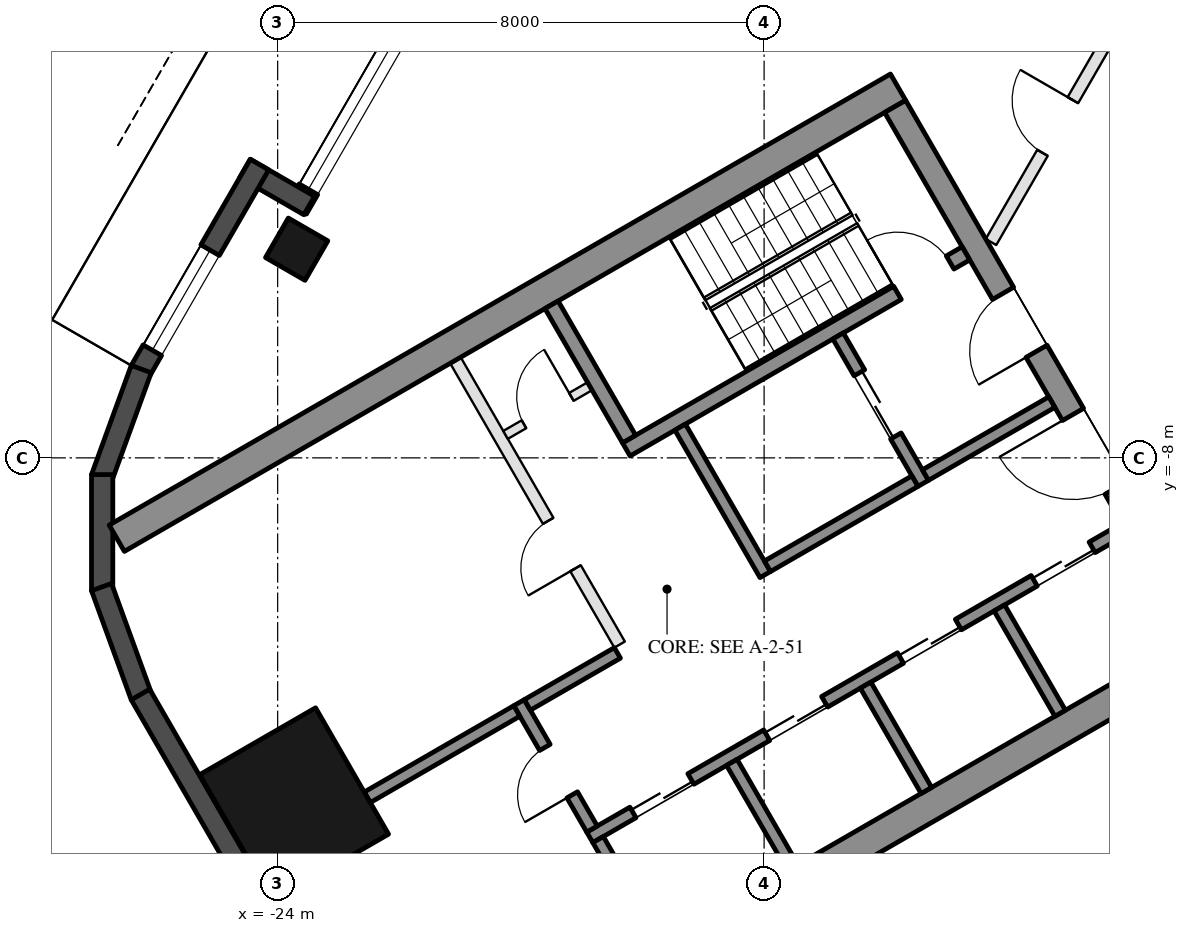
"""IFC4 building model, lengths in metres.
Left out: names, types, materials, properties, quantities, classifications, styles, units other than length and angle.
Written with IfcOpenShell. Run it as: python <this file> out.ifc"""

import sys

from ifc_helpers import new_model, si_unit, direction, frame, frame_2d, origin, origin_2d, place, context, subcontext, project, spatial, rectangle, hollow_rectangle, extrude, element, fill, save


model = new_model("IFC4")
c1 = context("Model", 3, precision=1e-05, world=origin(), true_north=direction((0.0, 1.0)))
c2 = subcontext(c1, "Body", "Model", "MODEL_VIEW")
j1 = project(units=[si_unit("LENGTHUNIT", "METRE"), si_unit("PLANEANGLEUNIT", "RADIAN")], contexts=[c1])
p1 = place(None, origin())
s1 = spatial("IfcSite", under=j1, at=p1, CompositionType="ELEMENT")
p2 = place(p1, origin())
s2 = spatial("IfcBuilding", under=s1, at=p2, CompositionType="ELEMENT")
p3 = place(p2, frame((0.0, 0.0, 220.6)))
s3 = spatial("IfcBuildingStorey", under=s2, at=p3, CompositionType="ELEMENT", Elevation=220.6)
p4 = place(p3, frame((-23.688, -4.568, 0.0), z_axis=(0.0, 0.0, 1.0), x_axis=(0.5, 0.866025403784, 0.0)))
e1 = element("IfcColumn", 1, at=p4, inside=s3, PredefinedType="COLUMN", context=c2, shape_type="SweptSolid", body=[
    extrude(hollow_rectangle(XDim=0.75, YDim=0.75, WallThickness=0.035, at=origin_2d()), origin(), (0.0, 0.0, 1.0), 3.7),
])
p5 = place(p3, frame((-23.729, -13.7, 0.0), z_axis=(0.0, 0.0, 1.0), x_axis=(-0.5, 0.866025403784, 0.0)))
e2 = element("IfcColumn", 2, at=p5, inside=s3, PredefinedType="COLUMN", context=c2, shape_type="SweptSolid", body=[
    extrude(hollow_rectangle(XDim=2.4, YDim=2.2, WallThickness=0.06, at=origin_2d()), origin(), (0.0, 0.0, 1.0), 3.7),
])
p6 = place(p3, frame((-20.309, 1.934, 0.0), z_axis=(0.0, 0.0, 1.0), x_axis=(-0.499992114976, -0.866029956157, 0.0)))
e3 = element("IfcWall", 3, at=p6, inside=s3, PredefinedType="SOLIDWALL", context=c2, shape_type="SweptSolid", body=[
    extrude(rectangle(XDim=6.74, YDim=0.35, at=frame_2d((3.37, 0.0))), origin(), (0.0, 0.0, 1.0), 3.55),
])
p7 = place(p6, frame((0.77, 0.0, 0.0)))
e4 = element("IfcOpeningElement", 4, at=p7, cuts=e3, PredefinedType="OPENING", context=c2, shape_type="SweptSolid", body=[
    extrude(rectangle(XDim=2.4, YDim=2.4, at=frame_2d((1.2, 1.2))), frame((0.0, 0.185, 0.0), z_axis=(0.0, -1.0, 0.0), x_axis=(1.0, 0.0, 0.0)), (0.0, 0.0, 1.0), 0.37),
])
p8 = place(p6, frame((3.47, 0.0, 0.3)))
e5 = element("IfcOpeningElement", 5, at=p8, cuts=e3, PredefinedType="OPENING", context=c2, shape_type="SweptSolid", body=[
    extrude(rectangle(XDim=2.9, YDim=2.65, at=frame_2d((1.45, 1.325))), frame((0.0, 0.185, 0.0), z_axis=(0.0, -1.0, 0.0), x_axis=(1.0, 0.0, 0.0)), (0.0, 0.0, 1.0), 0.37),
])
p9 = place(p3, frame((-23.481, -3.85, 0.0), z_axis=(0.0, 0.0, 1.0), x_axis=(-0.866092288191, 0.499884134912, 0.0)))
e6 = element("IfcWall", 6, at=p9, inside=s3, PredefinedType="SOLIDWALL", context=c2, shape_type="SweptSolid", body=[
    extrude(rectangle(XDim=1.22, YDim=0.35, at=frame_2d((0.61, 0.0))), origin(), (0.0, 0.0, 1.0), 3.55),
])
p10 = place(p3, frame((-24.299, -3.176, 0.0), z_axis=(0.0, 0.0, 1.0), x_axis=(-0.500028278809, -0.866009076391, 0.0)))
e7 = element("IfcWall", 7, at=p10, inside=s3, PredefinedType="SOLIDWALL", context=c2, shape_type="SweptSolid", body=[
    extrude(rectangle(XDim=3.916, YDim=0.35, at=frame_2d((1.958, 0.0))), origin(), (0.0, 0.0, 1.0), 3.55),
])
p11 = place(p10, frame((1.625, 0.0, 0.3)))
e8 = element("IfcOpeningElement", 8, at=p11, cuts=e7, PredefinedType="OPENING", context=c2, shape_type="SweptSolid", body=[
    extrude(rectangle(XDim=1.9, YDim=2.65, at=frame_2d((0.95, 1.325))), frame((0.0, 0.185, 0.0), z_axis=(0.0, -1.0, 0.0), x_axis=(1.0, 0.0, 0.0)), (0.0, 0.0, 1.0), 0.37),
])
for number, where, z_axis, x_axis in (
    (9, (-26.244, -6.54, 0.0), (0.0, 0.0, 1.0), (-0.342, -0.94, 0.0)),
    (10, (-26.886, -8.275, 0.0), (0.0, 0.0, 1.0), (0.0, -1.0, 0.0)),
    (11, (-26.897, -10.125, 0.0), (0.0, 0.0, 1.0), (0.342, -0.94, 0.0)),
):
    element("IfcWall", number, at=place(p3, frame(where, z_axis=z_axis, x_axis=x_axis)), inside=s3, PredefinedType="SOLIDWALL", context=c2, shape_type="SweptSolid", body=[
        extrude(rectangle(XDim=1.91, YDim=0.35, at=frame_2d((0.955, 0.0))), origin(), (0.0, 0.0, 1.0), 3.55),
    ])
p12 = place(p3, frame((-26.257, -11.893, 0.0), z_axis=(0.0, 0.0, 1.0), x_axis=(0.500018773155, -0.866014564827, 0.0)))
e12 = element("IfcWall", 12, at=p12, inside=s3, PredefinedType="SOLIDWALL", context=c2, shape_type="SweptSolid", body=[
    extrude(rectangle(XDim=5.658, YDim=0.35, at=frame_2d((2.829, 0.0))), origin(), (0.0, 0.0, 1.0), 3.55),
])
for number, where, z_axis, x_axis in (
    (13, (-13.797, -1.903, 0.0), (0.0, 0.0, 1.0), (-0.866, -0.5, 0.0)),
    (14, (-8.547, -10.997, 0.0), (0.0, 0.0, 1.0), (-0.866, -0.5, 0.0)),
):
    element("IfcWall", number, at=place(p3, frame(where, z_axis=z_axis, x_axis=x_axis)), inside=s3, PredefinedType="SHEAR", context=c2, shape_type="SweptSolid", body=[
        extrude(rectangle(XDim=14.837, YDim=0.5, at=frame_2d((7.418, 0.0))), origin(), (0.0, 0.0, 1.0), 3.5),
    ])
p13 = place(p3, frame((-13.845, -2.22, 0.0), z_axis=(0.0, 0.0, 1.0), x_axis=(0.500004234368, -0.866022959057, 0.0)))
e15 = element("IfcWall", 15, at=p13, inside=s3, PredefinedType="SHEAR", context=c2, shape_type="SweptSolid", body=[
    extrude(rectangle(XDim=10.0, YDim=0.4, at=frame_2d((5.0, 0.0))), origin(), (0.0, 0.0, 1.0), 3.5),
])
p14 = place(p13, frame((3.55, 0.0, 0.0)))
e16 = element("IfcOpeningElement", 16, at=p14, cuts=e15, PredefinedType="OPENING", context=c2, shape_type="SweptSolid", body=[
    extrude(rectangle(XDim=1.1, YDim=2.1, at=frame_2d((0.55, 1.05))), frame((0.0, 0.21, 0.0), z_axis=(0.0, -1.0, 0.0), x_axis=(1.0, 0.0, 0.0)), (0.0, 0.0, 1.0), 0.42),
])
p15 = place(p13, frame((5.85, 0.0, 0.0)))
e17 = element("IfcOpeningElement", 17, at=p15, cuts=e15, PredefinedType="OPENING", context=c2, shape_type="SweptSolid", body=[
    extrude(rectangle(XDim=1.4, YDim=2.1, at=frame_2d((0.7, 1.05))), frame((0.0, 0.21, 0.0), z_axis=(0.0, -1.0, 0.0), x_axis=(1.0, 0.0, 0.0)), (0.0, 0.0, 1.0), 0.42),
])
p16 = place(p3, frame((-12.681, -4.636, 0.0), z_axis=(0.0, 0.0, 1.0), x_axis=(-0.866021702275, -0.500006411147, 0.0)))
e18 = element("IfcWall", 18, at=p16, inside=s3, PredefinedType="SHEAR", context=c2, shape_type="SweptSolid", body=[
    extrude(rectangle(XDim=6.45, YDim=0.25, at=frame_2d((3.225, 0.0))), origin(), (0.0, 0.0, 1.0), 3.5),
])
p17 = place(p16, frame((0.3, 0.0, 0.0)))
e19 = element("IfcOpeningElement", 19, at=p17, cuts=e18, PredefinedType="OPENING", context=c2, shape_type="SweptSolid", body=[
    extrude(rectangle(XDim=1.0, YDim=2.1, at=frame_2d((0.5, 1.05))), frame((0.0, 0.135, 0.0), z_axis=(0.0, -1.0, 0.0), x_axis=(1.0, 0.0, 0.0)), (0.0, 0.0, 1.0), 0.27),
])
p18 = place(p3, frame((-19.496, -5.482, 0.0), z_axis=(0.0, 0.0, 1.0), x_axis=(0.499990435942, -0.866030925526, 0.0)))
e20 = element("IfcWall", 20, at=p18, inside=s3, PredefinedType="SHEAR", context=c2, shape_type="SweptSolid", body=[
    extrude(rectangle(XDim=2.55, YDim=0.25, at=frame_2d((1.275, 0.0))), origin(), (0.0, 0.0, 1.0), 3.5),
])
p19 = place(p3, frame((-17.381, -7.495, 0.0), z_axis=(0.0, 0.0, 1.0), x_axis=(0.500011755427, -0.866018616679, 0.0)))
e21 = element("IfcWall", 21, at=p19, inside=s3, PredefinedType="SHEAR", context=c2, shape_type="SweptSolid", body=[
    extrude(rectangle(XDim=2.8, YDim=0.2, at=frame_2d((1.4, 0.0))), origin(), (0.0, 0.0, 1.0), 3.5),
])
p20 = place(p3, frame((-14.783, -5.995, 0.0), z_axis=(0.0, 0.0, 1.0), x_axis=(0.49994636267, -0.866056369097, 0.0)))
e22 = element("IfcWall", 22, at=p20, inside=s3, PredefinedType="SHEAR", context=c2, shape_type="SweptSolid", body=[
    extrude(rectangle(XDim=2.8, YDim=0.2, at=frame_2d((1.4, 0.0))), origin(), (0.0, 0.0, 1.0), 3.5),
])
p21 = place(p20, frame((0.7, 0.0, 0.0)))
e23 = element("IfcOpeningElement", 23, at=p21, cuts=e22, PredefinedType="OPENING", context=c2, shape_type="SweptSolid", body=[
    extrude(rectangle(XDim=1.2, YDim=2.1, at=frame_2d((0.6, 1.05))), frame((0.0, 0.11, 0.0), z_axis=(0.0, -1.0, 0.0), x_axis=(1.0, 0.0, 0.0)), (0.0, 0.0, 1.0), 0.22),
])
p22 = place(p3, frame((-13.52, -8.383, 0.0), z_axis=(0.0, 0.0, 1.0), x_axis=(-0.866034573852, -0.49998411664, 0.0)))
e24 = element("IfcWall", 24, at=p22, inside=s3, PredefinedType="SHEAR", context=c2, shape_type="SweptSolid", body=[
    extrude(rectangle(XDim=2.8, YDim=0.2, at=frame_2d((1.4, 0.0))), origin(), (0.0, 0.0, 1.0), 3.5),
])
p23 = place(p3, frame((-11.268, -7.083, 0.0), z_axis=(0.0, 0.0, 1.0), x_axis=(-0.866050077142, -0.499957262057, 0.0)))
e25 = element("IfcWall", 25, at=p23, inside=s3, PredefinedType="SHEAR", context=c2, shape_type="SweptSolid", body=[
    extrude(rectangle(XDim=2.4, YDim=0.2, at=frame_2d((1.2, 0.0))), origin(), (0.0, 0.0, 1.0), 3.5),
])
p24 = place(p3, frame((-10.068, -9.162, 0.0), z_axis=(0.0, 0.0, 1.0), x_axis=(-0.866032725843, -0.499987317609, 0.0)))
e26 = element("IfcWall", 26, at=p24, inside=s3, PredefinedType="SHEAR", context=c2, shape_type="SweptSolid", body=[
    extrude(rectangle(XDim=10.16, YDim=0.2, at=frame_2d((5.08, 0.0))), origin(), (0.0, 0.0, 1.0), 3.5),
])
p25 = place(p24, frame((0.62, 0.0, 0.0)))
e27 = element("IfcOpeningElement", 27, at=p25, cuts=e26, PredefinedType="OPENING", context=c2, shape_type="SweptSolid", body=[
    extrude(rectangle(XDim=1.1, YDim=2.1, at=frame_2d((0.55, 1.05))), frame((0.0, 0.11, 0.0), z_axis=(0.0, -1.0, 0.0), x_axis=(1.0, 0.0, 0.0)), (0.0, 0.0, 1.0), 0.22),
])
p26 = place(p24, frame((3.16, 0.0, 0.0)))
e28 = element("IfcOpeningElement", 28, at=p26, cuts=e26, PredefinedType="OPENING", context=c2, shape_type="SweptSolid", body=[
    extrude(rectangle(XDim=1.1, YDim=2.1, at=frame_2d((0.55, 1.05))), frame((0.0, 0.11, 0.0), z_axis=(0.0, -1.0, 0.0), x_axis=(1.0, 0.0, 0.0)), (0.0, 0.0, 1.0), 0.22),
])
p27 = place(p24, frame((5.7, 0.0, 0.0)))
e29 = element("IfcOpeningElement", 29, at=p27, cuts=e26, PredefinedType="OPENING", context=c2, shape_type="SweptSolid", body=[
    extrude(rectangle(XDim=1.1, YDim=2.1, at=frame_2d((0.55, 1.05))), frame((0.0, 0.11, 0.0), z_axis=(0.0, -1.0, 0.0), x_axis=(1.0, 0.0, 0.0)), (0.0, 0.0, 1.0), 0.22),
])
p28 = place(p24, frame((8.24, 0.0, 0.0)))
e30 = element("IfcOpeningElement", 30, at=p28, cuts=e26, PredefinedType="OPENING", context=c2, shape_type="SweptSolid", body=[
    extrude(rectangle(XDim=1.1, YDim=2.1, at=frame_2d((0.55, 1.05))), frame((0.0, 0.11, 0.0), z_axis=(0.0, -1.0, 0.0), x_axis=(1.0, 0.0, 0.0)), (0.0, 0.0, 1.0), 0.22),
])
p29 = place(p3, frame((-20.031, -12.026, 0.0), z_axis=(0.0, 0.0, 1.0), x_axis=(0.500033551112, -0.866006032174, 0.0)))
e31 = element("IfcWall", 31, at=p29, inside=s3, PredefinedType="SHEAR", context=c2, shape_type="SweptSolid", body=[
    extrude(rectangle(XDim=2.4, YDim=0.2, at=frame_2d((1.2, 0.0))), origin(), (0.0, 0.0, 1.0), 3.5),
])
p30 = place(p29, frame((0.85, 0.0, 0.0)))
e32 = element("IfcOpeningElement", 32, at=p30, cuts=e31, PredefinedType="OPENING", context=c2, shape_type="SweptSolid", body=[
    extrude(rectangle(XDim=0.9, YDim=2.1, at=frame_2d((0.45, 1.05))), frame((0.0, 0.11, 0.0), z_axis=(0.0, -1.0, 0.0), x_axis=(1.0, 0.0, 0.0)), (0.0, 0.0, 1.0), 0.22),
])
p31 = place(p3, frame((-18.413, -11.208, 0.0), z_axis=(0.0, 0.0, 1.0), x_axis=(-0.866038183914, -0.499977863513, 0.0)))
e33 = element("IfcWall", 33, at=p31, inside=s3, PredefinedType="SHEAR", context=c2, shape_type="SweptSolid", body=[
    extrude(rectangle(XDim=1.71, YDim=0.2, at=frame_2d((0.855, 0.0))), origin(), (0.0, 0.0, 1.0), 3.5),
])
for number, where, z_axis, x_axis in (
    (34, (-12.131, -10.468, 0.0), (0.0, 0.0, 1.0), (0.5, -0.866, 0.0)),
    (35, (-14.331, -11.738, 0.0), (0.0, 0.0, 1.0), (0.5, -0.866, 0.0)),
    (36, (-16.531, -13.008, 0.0), (0.0, 0.0, 1.0), (0.5, -0.866, 0.0)),
    (37, (-18.73, -14.278, 0.0), (0.0, 0.0, 1.0), (0.5, -0.866, 0.0)),
):
    element("IfcWall", number, at=place(p3, frame(where, z_axis=z_axis, x_axis=x_axis)), inside=s3, PredefinedType="SHEAR", context=c2, shape_type="SweptSolid", body=[
        extrude(rectangle(XDim=2.0, YDim=0.2, at=frame_2d((1.0, 0.0))), origin(), (0.0, 0.0, 1.0), 3.5),
    ])
p32 = place(p3, frame((-20.067, -12.163, 0.0), z_axis=(0.0, 0.0, 1.0), x_axis=(-0.866055327414, -0.49994816717, 0.0)))
e38 = element("IfcWall", 38, at=p32, inside=s3, PredefinedType="SHEAR", context=c2, shape_type="SweptSolid", body=[
    extrude(rectangle(XDim=2.84, YDim=0.2, at=frame_2d((1.42, 0.0))), origin(), (0.0, 0.0, 1.0), 3.5),
])
p33 = place(p3, frame((-21.076, -6.395, 0.0), z_axis=(0.0, 0.0, 1.0), x_axis=(0.50001468107, -0.866016927499, 0.0)))
e39 = element("IfcWall", 39, at=p33, inside=s3, PredefinedType="PARTITIONING", context=c2, shape_type="SweptSolid", body=[
    extrude(rectangle(XDim=5.4, YDim=0.2, at=frame_2d((2.7, 0.0))), origin(), (0.0, 0.0, 1.0), 3.5),
])
p34 = place(p33, frame((3.05, 0.0, 0.0)))
e40 = element("IfcOpeningElement", 40, at=p34, cuts=e39, PredefinedType="OPENING", context=c2, shape_type="SweptSolid", body=[
    extrude(rectangle(XDim=0.9, YDim=2.1, at=frame_2d((0.45, 1.05))), frame((0.0, 0.11, 0.0), z_axis=(0.0, -1.0, 0.0), x_axis=(1.0, 0.0, 0.0)), (0.0, 0.0, 1.0), 0.22),
])
p35 = place(p3, frame((-18.866, -6.822, 0.0), z_axis=(0.0, 0.0, 1.0), x_axis=(-0.866028054938, -0.499995408039, 0.0)))
e41 = element("IfcWall", 41, at=p35, inside=s3, PredefinedType="PARTITIONING", context=c2, shape_type="SweptSolid", body=[
    extrude(rectangle(XDim=1.6, YDim=0.15, at=frame_2d((0.8, 0.0))), origin(), (0.0, 0.0, 1.0), 3.5),
])
p36 = place(p35, frame((0.35, 0.0, 0.0)))
e42 = element("IfcOpeningElement", 42, at=p36, cuts=e41, PredefinedType="OPENING", context=c2, shape_type="SweptSolid", body=[
    extrude(rectangle(XDim=0.9, YDim=2.1, at=frame_2d((0.45, 1.05))), frame((0.0, 0.085, 0.0), z_axis=(0.0, -1.0, 0.0), x_axis=(1.0, 0.0, 0.0)), (0.0, 0.0, 1.0), 0.17),
])
p37 = place(p3, frame((-12.269, -4.45, 0.0), z_axis=(0.0, 0.0, 1.0), x_axis=(0.499998569178, 0.866026229868, 0.0)))
e43 = element("IfcWall", 43, at=p37, inside=s3, PredefinedType="PARTITIONING", context=c2, shape_type="SweptSolid", body=[
    extrude(rectangle(XDim=4.388, YDim=0.2, at=frame_2d((2.194, 0.0))), origin(), (0.0, 0.0, 1.0), 2.95),
])
p38 = place(p37, frame((1.694, 0.0, 0.0)))
e44 = element("IfcOpeningElement", 44, at=p38, cuts=e43, PredefinedType="OPENING", context=c2, shape_type="SweptSolid", body=[
    extrude(rectangle(XDim=1.0, YDim=2.1, at=frame_2d((0.5, 1.05))), frame((0.0, 0.11, 0.0), z_axis=(0.0, -1.0, 0.0), x_axis=(1.0, 0.0, 0.0)), (0.0, 0.0, 1.0), 0.22),
])
p39 = place(p8, origin())
e45 = element("IfcWindow", 45, at=p39, inside=s3, PartitioningType="SINGLE_PANEL", PredefinedType="WINDOW", context=c2, shape_type="SweptSolid", body=[
    extrude(rectangle(XDim=2.9, YDim=2.65, at=frame_2d((1.45, 1.325))), frame((0.0, 0.03, 0.0), z_axis=(0.0, -1.0, 0.0), x_axis=(1.0, 0.0, 0.0)), (0.0, 0.0, 1.0), 0.06),
])
fill(e5, e45)
p40 = place(p11, origin())
e46 = element("IfcWindow", 46, at=p40, inside=s3, PartitioningType="SINGLE_PANEL", PredefinedType="WINDOW", context=c2, shape_type="SweptSolid", body=[
    extrude(rectangle(XDim=1.9, YDim=2.65, at=frame_2d((0.95, 1.325))), frame((0.0, 0.03, 0.0), z_axis=(0.0, -1.0, 0.0), x_axis=(1.0, 0.0, 0.0)), (0.0, 0.0, 1.0), 0.06),
])
fill(e8, e46)
p41 = place(p21, origin())
e47 = element("IfcDoor", 47, at=p41, inside=s3, OperationType="DOUBLE_DOOR_SLIDING", PredefinedType="DOOR", context=c2, shape_type="SweptSolid", body=[
    extrude(rectangle(XDim=1.2, YDim=2.1, at=frame_2d((0.6, 1.05))), frame((0.0, 0.025, 0.0), z_axis=(0.0, -1.0, 0.0), x_axis=(1.0, 0.0, 0.0)), (0.0, 0.0, 1.0), 0.05),
])
fill(e23, e47)
p42 = place(p36, frame((0.9, 0.0, 0.0), z_axis=(0.0, 0.0, 1.0), x_axis=(-1.0, 0.0, 0.0)))
e48 = element("IfcDoor", 48, at=p42, inside=s3, OperationType="SINGLE_SWING_RIGHT", PredefinedType="DOOR", context=c2, shape_type="SweptSolid", body=[
    extrude(rectangle(XDim=0.9, YDim=2.1, at=frame_2d((0.45, 1.05))), frame((0.0, 0.025, 0.0), z_axis=(0.0, -1.0, 0.0), x_axis=(1.0, 0.0, 0.0)), (0.0, 0.0, 1.0), 0.05),
])
fill(e42, e48)
p43 = place(p25, origin())
e49 = element("IfcDoor", 49, at=p43, inside=s3, OperationType="DOUBLE_DOOR_SLIDING", PredefinedType="DOOR", context=c2, shape_type="SweptSolid", body=[
    extrude(rectangle(XDim=1.1, YDim=2.1, at=frame_2d((0.55, 1.05))), frame((0.0, 0.025, 0.0), z_axis=(0.0, -1.0, 0.0), x_axis=(1.0, 0.0, 0.0)), (0.0, 0.0, 1.0), 0.05),
])
fill(e27, e49)
p44 = place(p26, origin())
e50 = element("IfcDoor", 50, at=p44, inside=s3, OperationType="DOUBLE_DOOR_SLIDING", PredefinedType="DOOR", context=c2, shape_type="SweptSolid", body=[
    extrude(rectangle(XDim=1.1, YDim=2.1, at=frame_2d((0.55, 1.05))), frame((0.0, 0.025, 0.0), z_axis=(0.0, -1.0, 0.0), x_axis=(1.0, 0.0, 0.0)), (0.0, 0.0, 1.0), 0.05),
])
fill(e28, e50)
p45 = place(p27, origin())
e51 = element("IfcDoor", 51, at=p45, inside=s3, OperationType="DOUBLE_DOOR_SLIDING", PredefinedType="DOOR", context=c2, shape_type="SweptSolid", body=[
    extrude(rectangle(XDim=1.1, YDim=2.1, at=frame_2d((0.55, 1.05))), frame((0.0, 0.025, 0.0), z_axis=(0.0, -1.0, 0.0), x_axis=(1.0, 0.0, 0.0)), (0.0, 0.0, 1.0), 0.05),
])
fill(e29, e51)
p46 = place(p28, origin())
e52 = element("IfcDoor", 52, at=p46, inside=s3, OperationType="DOUBLE_DOOR_SLIDING", PredefinedType="DOOR", context=c2, shape_type="SweptSolid", body=[
    extrude(rectangle(XDim=1.1, YDim=2.1, at=frame_2d((0.55, 1.05))), frame((0.0, 0.025, 0.0), z_axis=(0.0, -1.0, 0.0), x_axis=(1.0, 0.0, 0.0)), (0.0, 0.0, 1.0), 0.05),
])
fill(e30, e52)
p47 = place(p30, frame((0.9, 0.0, 0.0), z_axis=(0.0, 0.0, 1.0), x_axis=(-1.0, 0.0, 0.0)))
e53 = element("IfcDoor", 53, at=p47, inside=s3, OperationType="SINGLE_SWING_LEFT", PredefinedType="DOOR", context=c2, shape_type="SweptSolid", body=[
    extrude(rectangle(XDim=0.9, YDim=2.1, at=frame_2d((0.45, 1.05))), frame((0.0, 0.025, 0.0), z_axis=(0.0, -1.0, 0.0), x_axis=(1.0, 0.0, 0.0)), (0.0, 0.0, 1.0), 0.05),
])
fill(e32, e53)
p48 = place(p34, frame((0.9, 0.0, 0.0), z_axis=(0.0, 0.0, 1.0), x_axis=(-1.0, 0.0, 0.0)))
e54 = element("IfcDoor", 54, at=p48, inside=s3, OperationType="SINGLE_SWING_LEFT", PredefinedType="DOOR", context=c2, shape_type="SweptSolid", body=[
    extrude(rectangle(XDim=0.9, YDim=2.1, at=frame_2d((0.45, 1.05))), frame((0.0, 0.025, 0.0), z_axis=(0.0, -1.0, 0.0), x_axis=(1.0, 0.0, 0.0)), (0.0, 0.0, 1.0), 0.05),
])
fill(e40, e54)
p49 = place(p14, frame((1.1, 0.0, 0.0), z_axis=(0.0, 0.0, 1.0), x_axis=(-1.0, 0.0, 0.0)))
e55 = element("IfcDoor", 55, at=p49, inside=s3, OperationType="SINGLE_SWING_LEFT", PredefinedType="DOOR", context=c2, shape_type="SweptSolid", body=[
    extrude(rectangle(XDim=1.1, YDim=2.1, at=frame_2d((0.55, 1.05))), frame((0.0, 0.025, 0.0), z_axis=(0.0, -1.0, 0.0), x_axis=(1.0, 0.0, 0.0)), (0.0, 0.0, 1.0), 0.05),
])
fill(e16, e55)
p50 = place(p15, frame((1.4, 0.0, 0.0), z_axis=(0.0, 0.0, 1.0), x_axis=(-1.0, 0.0, 0.0)))
e56 = element("IfcDoor", 56, at=p50, inside=s3, OperationType="DOUBLE_DOOR_SINGLE_SWING", PredefinedType="DOOR", context=c2, shape_type="SweptSolid", body=[
    extrude(rectangle(XDim=1.4, YDim=2.1, at=frame_2d((0.7, 1.05))), frame((0.0, 0.025, 0.0), z_axis=(0.0, -1.0, 0.0), x_axis=(1.0, 0.0, 0.0)), (0.0, 0.0, 1.0), 0.05),
])
fill(e17, e56)
p51 = place(p17, frame((1.0, 0.0, 0.0), z_axis=(0.0, 0.0, 1.0), x_axis=(-1.0, 0.0, 0.0)))
e57 = element("IfcDoor", 57, at=p51, inside=s3, OperationType="SINGLE_SWING_LEFT", PredefinedType="DOOR", context=c2, shape_type="SweptSolid", body=[
    extrude(rectangle(XDim=1.0, YDim=2.1, at=frame_2d((0.5, 1.05))), frame((0.0, 0.025, 0.0), z_axis=(0.0, -1.0, 0.0), x_axis=(1.0, 0.0, 0.0)), (0.0, 0.0, 1.0), 0.05),
])
fill(e19, e57)
p52 = place(p38, origin())
e58 = element("IfcDoor", 58, at=p52, inside=s3, OperationType="SINGLE_SWING_RIGHT", PredefinedType="DOOR", context=c2, shape_type="SweptSolid", body=[
    extrude(rectangle(XDim=1.0, YDim=2.1, at=frame_2d((0.5, 1.05))), frame((0.0, 0.025, 0.0), z_axis=(0.0, -1.0, 0.0), x_axis=(1.0, 0.0, 0.0)), (0.0, 0.0, 1.0), 0.05),
])
fill(e44, e58)
save(model, sys.argv[1])
